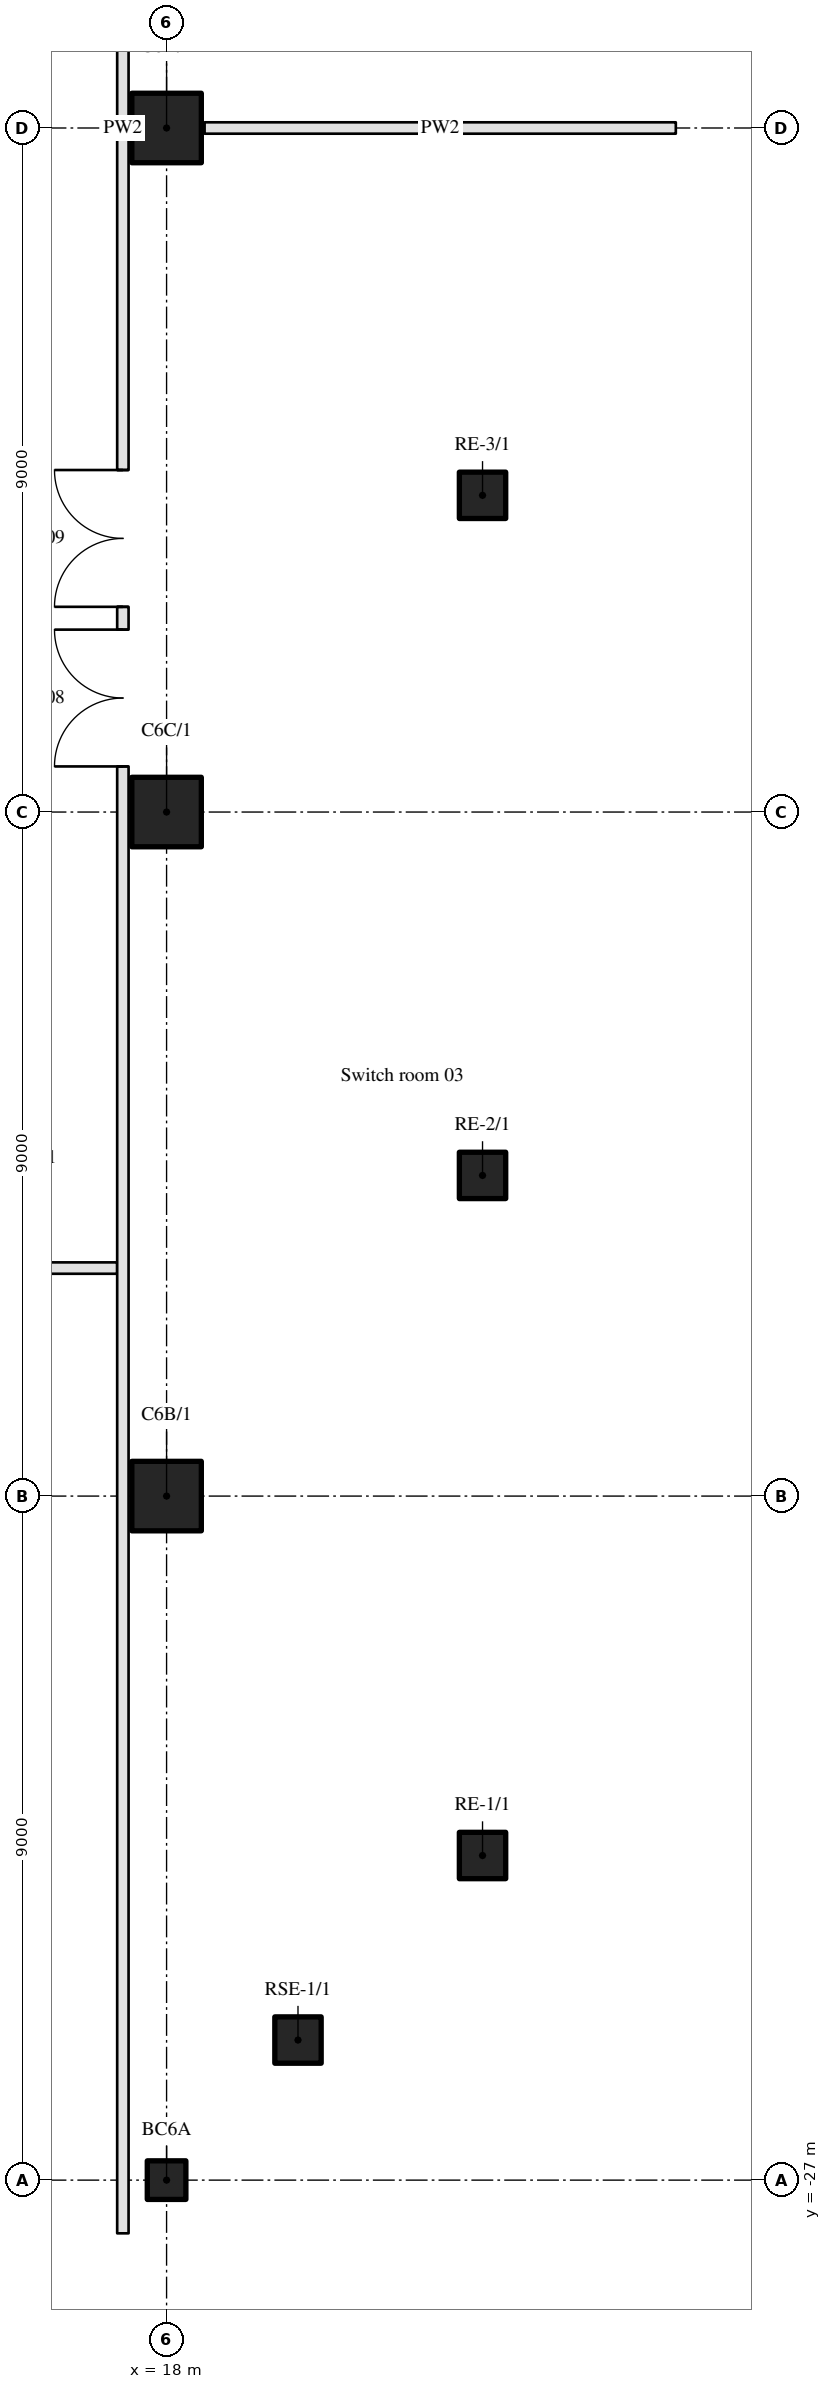
"""IFC4 building model, lengths in metres.
Left out: names, types, materials, properties, quantities, classifications, styles, units other than length and angle.
Written with IfcOpenShell. Run it as: python <this file> out.ifc"""

import sys

from ifc_helpers import new_model, si_unit, direction, frame, frame_2d, origin, origin_2d, place, context, subcontext, project, spatial, rectangle, hollow_circle, extrude, element, fill, save


model = new_model("IFC4")
c1 = context("Model", 3, precision=1e-05, world=origin(), true_north=direction((0.0, 1.0)))
c2 = subcontext(c1, "Body", "Model", "MODEL_VIEW")
j1 = project(units=[si_unit("LENGTHUNIT", "METRE"), si_unit("PLANEANGLEUNIT", "RADIAN")], contexts=[c1])
p1 = place(None, origin())
s1 = spatial("IfcSite", under=j1, at=p1, CompositionType="ELEMENT")
p2 = place(p1, origin())
s2 = spatial("IfcBuilding", under=s1, at=p2, CompositionType="ELEMENT")
p3 = place(p2, frame((0.0, 0.0, -5.0)))
s3 = spatial("IfcBuildingStorey", under=s2, at=p3, CompositionType="ELEMENT", Elevation=-5.0)
p4 = place(p3, frame((24.129, -33.438, -0.25), z_axis=(0.0, 0.0, 1.0), x_axis=(0.707106781187, 0.707106781187, 0.0)))
e1 = element("IfcWall", 1, at=p4, inside=s3, PredefinedType="SOLIDWALL", context=c2, shape_type="SweptSolid", body=[
    extrude(rectangle(XDim=8.922, YDim=0.6, at=frame_2d((4.461, 0.0))), origin(), (0.0, 0.0, 1.0), 4.8),
])
for number, where, z_axis, x_axis in (
    (2, (18.0, -18.0, -0.25), (0.0, 0.0, 1.0), (1.0, 0.0, 0.0)),
    (3, (18.0, -9.0, -0.25), (0.0, 0.0, 1.0), (1.0, 0.0, 0.0)),
    (4, (18.0, 0.0, -0.25), (0.0, 0.0, 1.0), (1.0, 0.0, 0.0)),
):
    element("IfcColumn", number, at=place(p3, frame(where, z_axis=z_axis, x_axis=x_axis)), inside=s3, PredefinedType="COLUMN", context=c2, shape_type="SweptSolid", body=[
        extrude(hollow_circle(Radius=0.457, WallThickness=0.05, at=origin_2d()), origin(), (0.0, 0.0, 1.0), 5.25),
    ])
for number, where, z_axis, x_axis in (
    (5, (19.729, -25.157, -0.25), (0.0, 0.0, 1.0), (1.0, 0.0, 0.0)),
    (6, (22.157, -22.729, -0.25), (0.0, 0.0, 1.0), (1.0, 0.0, 0.0)),
    (7, (22.157, -13.781, -0.25), (0.0, 0.0, 1.0), (1.0, 0.0, 0.0)),
    (8, (22.157, -4.833, -0.25), (0.0, 0.0, 1.0), (1.0, 0.0, 0.0)),
):
    element("IfcColumn", number, at=place(p3, frame(where, z_axis=z_axis, x_axis=x_axis)), inside=s3, PredefinedType="COLUMN", context=c2, shape_type="SweptSolid", body=[
        extrude(hollow_circle(Radius=0.305, WallThickness=0.03, at=origin_2d()), origin(), (0.0, 0.0, 1.0), 5.25),
    ])
p5 = place(p3, frame((18.0, -27.0, -0.25), z_axis=(0.0, 0.0, 1.0), x_axis=(1.0, 0.0, 0.0)))
e9 = element("IfcColumn", 9, at=p5, inside=s3, PredefinedType="COLUMN", context=c2, shape_type="SweptSolid", body=[
    extrude(hollow_circle(Radius=0.254, WallThickness=0.03, at=origin_2d()), origin(), (0.0, 0.0, 1.0), 4.8),
])
p6 = place(p3, frame((-17.35, -15.0, 0.0), z_axis=(0.0, 0.0, 1.0), x_axis=(1.0, 0.0, 0.0)))
e10 = element("IfcWall", 10, at=p6, inside=s3, PredefinedType="PARTITIONING", context=c2, shape_type="SweptSolid", body=[
    extrude(rectangle(XDim=34.7, YDim=0.15, at=frame_2d((17.35, 0.0))), origin(), (0.0, 0.0, 1.0), 4.06),
])
p7 = place(p6, frame((3.525, 0.0, 0.0)))
e11 = element("IfcOpeningElement", 11, at=p7, cuts=e10, PredefinedType="OPENING", context=c2, shape_type="SweptSolid", body=[
    extrude(rectangle(XDim=1.8, YDim=2.1, at=frame_2d((0.9, 1.05))), frame((0.0, 0.085, 0.0), z_axis=(0.0, -1.0, 0.0), x_axis=(1.0, 0.0, 0.0)), (0.0, 0.0, 1.0), 0.17),
])
p8 = place(p6, frame((29.375, 0.0, 0.0)))
e12 = element("IfcOpeningElement", 12, at=p8, cuts=e10, PredefinedType="OPENING", context=c2, shape_type="SweptSolid", body=[
    extrude(rectangle(XDim=1.8, YDim=2.1, at=frame_2d((0.9, 1.05))), frame((0.0, 0.085, 0.0), z_axis=(0.0, -1.0, 0.0), x_axis=(1.0, 0.0, 0.0)), (0.0, 0.0, 1.0), 0.17),
])
p9 = place(p3, frame((18.5, 0.0, 0.0), z_axis=(0.0, 0.0, 1.0), x_axis=(1.0, 0.0, 0.0)))
e13 = element("IfcWall", 13, at=p9, inside=s3, PredefinedType="PARTITIONING", context=c2, shape_type="SweptSolid", body=[
    extrude(rectangle(XDim=6.2, YDim=0.15, at=frame_2d((3.1, 0.0))), origin(), (0.0, 0.0, 1.0), 4.06),
])
p10 = place(p3, frame((17.425, -27.7, 0.0), z_axis=(0.0, 0.0, 1.0), x_axis=(0.0, 1.0, 0.0)))
e14 = element("IfcWall", 14, at=p10, inside=s3, PredefinedType="PARTITIONING", context=c2, shape_type="SweptSolid", body=[
    extrude(rectangle(XDim=55.4, YDim=0.15, at=frame_2d((27.7, 0.0))), origin(), (0.0, 0.0, 1.0), 4.06),
])
p11 = place(p10, frame((19.3, 0.0, 0.0)))
e15 = element("IfcOpeningElement", 15, at=p11, cuts=e14, PredefinedType="OPENING", context=c2, shape_type="SweptSolid", body=[
    extrude(rectangle(XDim=1.8, YDim=2.1, at=frame_2d((0.9, 1.05))), frame((0.0, 0.085, 0.0), z_axis=(0.0, -1.0, 0.0), x_axis=(1.0, 0.0, 0.0)), (0.0, 0.0, 1.0), 0.17),
])
p12 = place(p10, frame((21.4, 0.0, 0.0)))
e16 = element("IfcOpeningElement", 16, at=p12, cuts=e14, PredefinedType="OPENING", context=c2, shape_type="SweptSolid", body=[
    extrude(rectangle(XDim=1.8, YDim=2.1, at=frame_2d((0.9, 1.05))), frame((0.0, 0.085, 0.0), z_axis=(0.0, -1.0, 0.0), x_axis=(1.0, 0.0, 0.0)), (0.0, 0.0, 1.0), 0.17),
])
p13 = place(p10, frame((29.8, 0.0, 0.0)))
e17 = element("IfcOpeningElement", 17, at=p13, cuts=e14, PredefinedType="OPENING", context=c2, shape_type="SweptSolid", body=[
    extrude(rectangle(XDim=1.8, YDim=2.1, at=frame_2d((0.9, 1.05))), frame((0.0, 0.085, 0.0), z_axis=(0.0, -1.0, 0.0), x_axis=(1.0, 0.0, 0.0)), (0.0, 0.0, 1.0), 0.17),
])
p14 = place(p11, origin())
e18 = element("IfcDoor", 18, at=p14, inside=s3, OperationType="DOUBLE_DOOR_SINGLE_SWING", PredefinedType="DOOR", context=c2, shape_type="SweptSolid", body=[
    extrude(rectangle(XDim=1.8, YDim=2.1, at=frame_2d((0.9, 1.05))), frame((0.0, 0.025, 0.0), z_axis=(0.0, -1.0, 0.0), x_axis=(1.0, 0.0, 0.0)), (0.0, 0.0, 1.0), 0.05),
])
fill(e15, e18)
p15 = place(p12, origin())
e19 = element("IfcDoor", 19, at=p15, inside=s3, OperationType="DOUBLE_DOOR_SINGLE_SWING", PredefinedType="DOOR", context=c2, shape_type="SweptSolid", body=[
    extrude(rectangle(XDim=1.8, YDim=2.1, at=frame_2d((0.9, 1.05))), frame((0.0, 0.025, 0.0), z_axis=(0.0, -1.0, 0.0), x_axis=(1.0, 0.0, 0.0)), (0.0, 0.0, 1.0), 0.05),
])
fill(e16, e19)
save(model, sys.argv[1])
